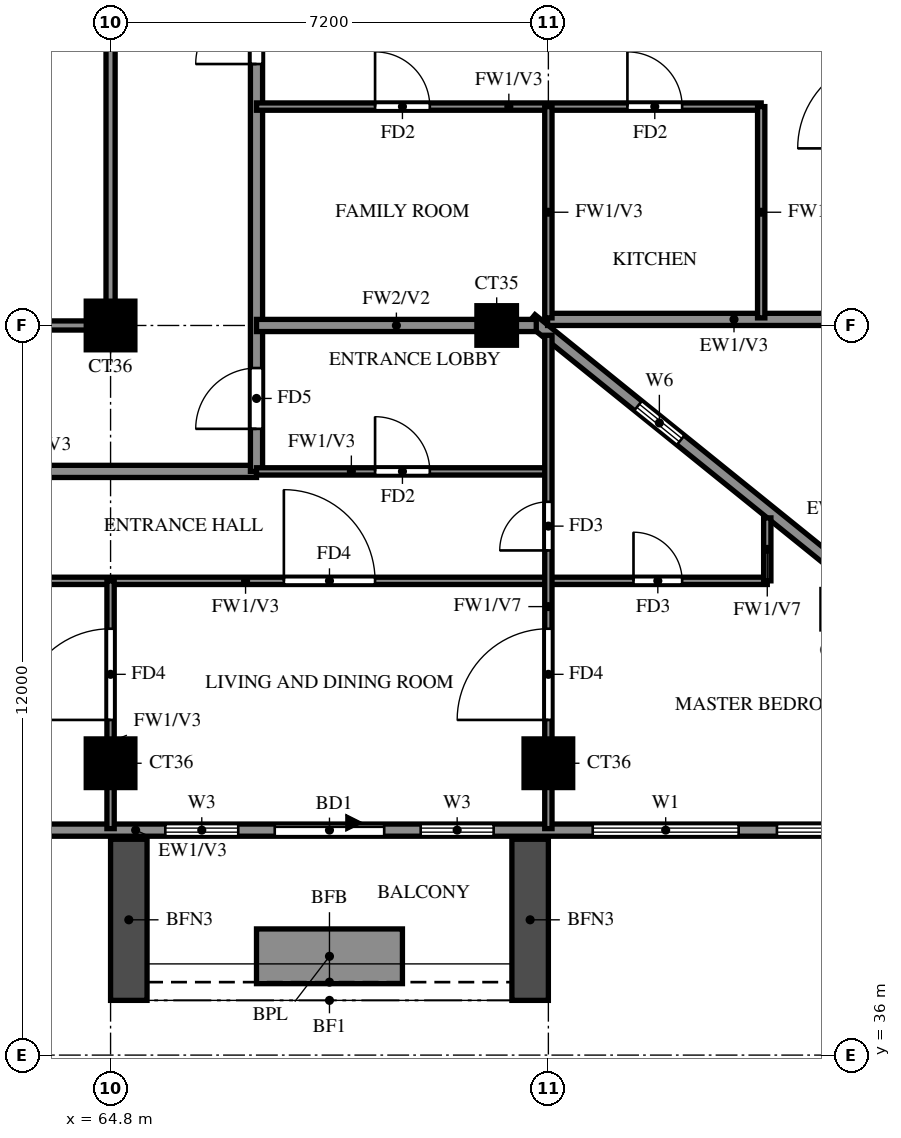
"""IFC4 building model, lengths in metres.
Left out: names, types, materials, properties, quantities, classifications, styles, units other than length and angle.
Written with IfcOpenShell. Run it as: python <this file> out.ifc"""

import sys

from ifc_helpers import new_model, si_unit, direction, frame, frame_2d, origin, origin_2d, place, context, subcontext, project, spatial, rectangle, extrude, source, transform, mapped, element, fill, save


model = new_model("IFC4")
c1 = context("Model", 3, precision=1e-05, world=origin(), true_north=direction((0.0, 1.0)))
c2 = subcontext(c1, "Body", "Model", "MODEL_VIEW")
j1 = project(units=[si_unit("LENGTHUNIT", "METRE"), si_unit("PLANEANGLEUNIT", "RADIAN")], contexts=[c1])
p1 = place(None, origin())
s1 = spatial("IfcSite", under=j1, at=p1, CompositionType="ELEMENT")
p2 = place(p1, origin())
s2 = spatial("IfcBuilding", under=s1, at=p2, CompositionType="ELEMENT")
p3 = place(p2, frame((0.0, 0.0, 232.5)))
s3 = spatial("IfcBuildingStorey", under=s2, at=p3, CompositionType="ELEMENT", Elevation=232.5)
m1 = source(origin(), c2, "Body", "SweptSolid", [
    extrude(rectangle(XDim=0.8, YDim=0.8, at=origin_2d()), origin(), (0.0, 0.0, 1.0), 3.22),
])
for number, where, z_axis, x_axis in (
    (1, (64.8, 40.8, 0.0), (0.0, 0.0, 1.0), (1.0, 0.0, 0.0)),
    (2, (72.0, 40.8, 0.0), (0.0, 0.0, 1.0), (1.0, 0.0, 0.0)),
):
    element("IfcColumn", number, at=place(p3, frame(where, z_axis=z_axis, x_axis=x_axis)), inside=s3, PredefinedType="COLUMN", context=c2, shape_type="MappedRepresentation", body=[
        mapped(m1, transform((0.0, 0.0, 0.0))),
    ])
m2 = source(origin(), c2, "Body", "SweptSolid", [
    extrude(rectangle(XDim=0.65, YDim=0.65, at=origin_2d()), origin(), (0.0, 0.0, 1.0), 3.22),
])
p4 = place(p3, frame((76.823, 43.333, 0.0), z_axis=(0.0, 0.0, 1.0), x_axis=(1.0, 0.0, 0.0)))
e3 = element("IfcColumn", 3, at=p4, inside=s3, PredefinedType="COLUMN", context=c2, shape_type="MappedRepresentation", body=[
    mapped(m2, transform((0.0, 0.0, 0.0))),
])
p5 = place(p3, frame((64.8, 48.0, 0.0), z_axis=(0.0, 0.0, 1.0), x_axis=(1.0, 0.0, 0.0)))
e4 = element("IfcColumn", 4, at=p5, inside=s3, PredefinedType="COLUMN", context=c2, shape_type="MappedRepresentation", body=[
    mapped(m1, transform((0.0, 0.0, 0.0))),
])
p6 = place(p3, frame((71.15, 48.0, 0.0), z_axis=(0.0, 0.0, 1.0), x_axis=(1.0, 0.0, 0.0)))
e5 = element("IfcColumn", 5, at=p6, inside=s3, PredefinedType="COLUMN", context=c2, shape_type="MappedRepresentation", body=[
    mapped(m2, transform((0.0, 0.0, 0.0))),
])
p7 = place(p3, frame((81.907, 39.87, 0.0), z_axis=(0.0, 0.0, 1.0), x_axis=(-0.777936274417, 0.62834318087, 0.0)))
e6 = element("IfcWall", 6, at=p7, inside=s3, PredefinedType="SOLIDWALL", context=c2, shape_type="SweptSolid", body=[
    extrude(rectangle(XDim=13.099, YDim=0.2, at=frame_2d((6.549, 0.0))), origin(), (0.0, 0.0, 1.0), 3.22),
])
p8 = place(p7, frame((9.938, 0.0, 1.5)))
e7 = element("IfcOpeningElement", 7, at=p8, cuts=e6, PredefinedType="OPENING", context=c2, shape_type="SweptSolid", body=[
    extrude(rectangle(XDim=0.9, YDim=0.9, at=frame_2d((0.45, 0.45))), frame((0.0, 0.11, 0.0), z_axis=(0.0, -1.0, 0.0), x_axis=(1.0, 0.0, 0.0)), (0.0, 0.0, 1.0), 0.22),
])
p9 = place(p3, frame((71.987, 48.1, 0.0), z_axis=(0.0, 0.0, 1.0), x_axis=(1.0, 0.0, 0.0)))
e8 = element("IfcWall", 8, at=p9, inside=s3, PredefinedType="SOLIDWALL", context=c2, shape_type="SweptSolid", body=[
    extrude(rectangle(XDim=6.813, YDim=0.2, at=frame_2d((3.406, 0.0))), origin(), (0.0, 0.0, 1.0), 3.22),
])
p10 = place(p3, frame((58.8, 39.7, 0.0), z_axis=(0.0, 0.0, 1.0), x_axis=(1.0, 0.0, 0.0)))
e9 = element("IfcWall", 9, at=p10, inside=s3, PredefinedType="SOLIDWALL", context=c2, shape_type="SweptSolid", body=[
    extrude(rectangle(XDim=23.317, YDim=0.2, at=frame_2d((11.658, 0.0))), origin(), (0.0, 0.0, 1.0), 3.22),
])
p11 = place(p10, frame((8.7, 0.0, 0.0)))
e10 = element("IfcOpeningElement", 10, at=p11, cuts=e9, PredefinedType="OPENING", context=c2, shape_type="SweptSolid", body=[
    extrude(rectangle(XDim=1.8, YDim=2.4, at=frame_2d((0.9, 1.2))), frame((0.0, 0.11, 0.0), z_axis=(0.0, -1.0, 0.0), x_axis=(1.0, 0.0, 0.0)), (0.0, 0.0, 1.0), 0.22),
])
p12 = place(p10, frame((6.9, 0.0, 0.6)))
e11 = element("IfcOpeningElement", 11, at=p12, cuts=e9, PredefinedType="OPENING", context=c2, shape_type="SweptSolid", body=[
    extrude(rectangle(XDim=1.2, YDim=2.4, at=frame_2d((0.6, 1.2))), frame((0.0, 0.11, 0.0), z_axis=(0.0, -1.0, 0.0), x_axis=(1.0, 0.0, 0.0)), (0.0, 0.0, 1.0), 0.22),
])
p13 = place(p10, frame((11.1, 0.0, 0.6)))
e12 = element("IfcOpeningElement", 12, at=p13, cuts=e9, PredefinedType="OPENING", context=c2, shape_type="SweptSolid", body=[
    extrude(rectangle(XDim=1.2, YDim=2.4, at=frame_2d((0.6, 1.2))), frame((0.0, 0.11, 0.0), z_axis=(0.0, -1.0, 0.0), x_axis=(1.0, 0.0, 0.0)), (0.0, 0.0, 1.0), 0.22),
])
p14 = place(p10, frame((13.929, 0.0, 0.6)))
e13 = element("IfcOpeningElement", 13, at=p14, cuts=e9, PredefinedType="OPENING", context=c2, shape_type="SweptSolid", body=[
    extrude(rectangle(XDim=2.4, YDim=2.4, at=frame_2d((1.2, 1.2))), frame((0.0, 0.11, 0.0), z_axis=(0.0, -1.0, 0.0), x_axis=(1.0, 0.0, 0.0)), (0.0, 0.0, 1.0), 0.22),
])
p15 = place(p10, frame((16.958, 0.0, 0.6)))
e14 = element("IfcOpeningElement", 14, at=p15, cuts=e9, PredefinedType="OPENING", context=c2, shape_type="SweptSolid", body=[
    extrude(rectangle(XDim=2.4, YDim=2.4, at=frame_2d((1.2, 1.2))), frame((0.0, 0.11, 0.0), z_axis=(0.0, -1.0, 0.0), x_axis=(1.0, 0.0, 0.0)), (0.0, 0.0, 1.0), 0.22),
])
p16 = place(p10, frame((19.988, 0.0, 0.6)))
e15 = element("IfcOpeningElement", 15, at=p16, cuts=e9, PredefinedType="OPENING", context=c2, shape_type="SweptSolid", body=[
    extrude(rectangle(XDim=2.4, YDim=2.4, at=frame_2d((1.2, 1.2))), frame((0.0, 0.11, 0.0), z_axis=(0.0, -1.0, 0.0), x_axis=(1.0, 0.0, 0.0)), (0.0, 0.0, 1.0), 0.22),
])
for number, where, z_axis, x_axis in (
    (16, (65.1, 39.55, 0.0), (0.0, 0.0, 1.0), (0.0, -1.0, 0.0)),
    (17, (71.7, 39.55, 0.0), (0.0, 0.0, 1.0), (0.0, -1.0, 0.0)),
):
    element("IfcWall", number, at=place(p3, frame(where, z_axis=z_axis, x_axis=x_axis)), inside=s3, PredefinedType="SOLIDWALL", context=c2, shape_type="SweptSolid", body=[
        extrude(rectangle(XDim=2.65, YDim=0.6, at=frame_2d((1.325, 0.0))), origin(), (0.0, 0.0, 1.0), 2.85),
    ])
p17 = place(p3, frame((67.2, 37.625, 0.0), z_axis=(0.0, 0.0, 1.0), x_axis=(1.0, 0.0, 0.0)))
e18 = element("IfcWall", 18, at=p17, inside=s3, PredefinedType="SOLIDWALL", context=c2, shape_type="SweptSolid", body=[
    extrude(rectangle(XDim=2.4, YDim=0.9, at=frame_2d((1.2, 0.0))), origin(), (0.0, 0.0, 1.0), 0.9),
])
p18 = place(p3, frame((60.0, 45.6, 0.0), z_axis=(0.0, 0.0, 1.0), x_axis=(1.0, 0.0, 0.0)))
e19 = element("IfcWall", 19, at=p18, inside=s3, PredefinedType="SOLIDWALL", context=c2, shape_type="SweptSolid", body=[
    extrude(rectangle(XDim=7.2, YDim=0.2, at=frame_2d((3.6, 0.0))), origin(), (0.0, 0.0, 1.0), 3.22),
])
p19 = place(p3, frame((67.2, 45.6, 0.0), z_axis=(0.0, 0.0, 1.0), x_axis=(0.0, 1.0, 0.0)))
e20 = element("IfcWall", 20, at=p19, inside=s3, PredefinedType="SOLIDWALL", context=c2, shape_type="SweptSolid", body=[
    extrude(rectangle(XDim=16.8, YDim=0.2, at=frame_2d((8.4, 0.0))), origin(), (0.0, 0.0, 1.0), 3.22),
])
p20 = place(p19, frame((6.7, 0.0, 0.0)))
e21 = element("IfcOpeningElement", 21, at=p20, cuts=e20, PredefinedType="OPENING", context=c2, shape_type="SweptSolid", body=[
    extrude(rectangle(XDim=1.0, YDim=2.1, at=frame_2d((0.5, 1.05))), frame((0.0, 0.11, 0.0), z_axis=(0.0, -1.0, 0.0), x_axis=(1.0, 0.0, 0.0)), (0.0, 0.0, 1.0), 0.22),
])
p21 = place(p19, frame((15.1, 0.0, 0.0)))
e22 = element("IfcOpeningElement", 22, at=p21, cuts=e20, PredefinedType="OPENING", context=c2, shape_type="SweptSolid", body=[
    extrude(rectangle(XDim=1.0, YDim=2.1, at=frame_2d((0.5, 1.05))), frame((0.0, 0.11, 0.0), z_axis=(0.0, -1.0, 0.0), x_axis=(1.0, 0.0, 0.0)), (0.0, 0.0, 1.0), 0.22),
])
p22 = place(p19, frame((0.7, 0.0, 0.0)))
e23 = element("IfcOpeningElement", 23, at=p22, cuts=e20, PredefinedType="OPENING", context=c2, shape_type="SweptSolid", body=[
    extrude(rectangle(XDim=1.0, YDim=2.1, at=frame_2d((0.5, 1.05))), frame((0.0, 0.11, 0.0), z_axis=(0.0, -1.0, 0.0), x_axis=(1.0, 0.0, 0.0)), (0.0, 0.0, 1.0), 0.22),
])
p23 = place(p3, frame((67.2, 48.0, 0.0), z_axis=(0.0, 0.0, 1.0), x_axis=(1.0, 0.0, 0.0)))
e24 = element("IfcWall", 24, at=p23, inside=s3, PredefinedType="SOLIDWALL", context=c2, shape_type="SweptSolid", body=[
    extrude(rectangle(XDim=4.601, YDim=0.2, at=frame_2d((2.301, 0.0))), origin(), (0.0, 0.0, 1.0), 3.22),
])
p24 = place(p3, frame((60.0, 43.8, 0.0), z_axis=(0.0, 0.0, 1.0), x_axis=(1.0, 0.0, 0.0)))
e25 = element("IfcWall", 25, at=p24, inside=s3, PredefinedType="PARTITIONING", context=c2, shape_type="SweptSolid", body=[
    extrude(rectangle(XDim=15.6, YDim=0.12, at=frame_2d((7.8, 0.0))), origin(), (0.0, 0.0, 1.0), 3.22),
])
p25 = place(p24, frame((7.65, 0.0, 0.0)))
e26 = element("IfcOpeningElement", 26, at=p25, cuts=e25, PredefinedType="OPENING", context=c2, shape_type="SweptSolid", body=[
    extrude(rectangle(XDim=1.5, YDim=2.1, at=frame_2d((0.75, 1.05))), frame((0.0, 0.07, 0.0), z_axis=(0.0, -1.0, 0.0), x_axis=(1.0, 0.0, 0.0)), (0.0, 0.0, 1.0), 0.14),
])
p26 = place(p24, frame((1.95, 0.0, 0.0)))
e27 = element("IfcOpeningElement", 27, at=p26, cuts=e25, PredefinedType="OPENING", context=c2, shape_type="SweptSolid", body=[
    extrude(rectangle(XDim=0.9, YDim=2.1, at=frame_2d((0.45, 1.05))), frame((0.0, 0.07, 0.0), z_axis=(0.0, -1.0, 0.0), x_axis=(1.0, 0.0, 0.0)), (0.0, 0.0, 1.0), 0.14),
])
p27 = place(p24, frame((13.4, 0.0, 0.0)))
e28 = element("IfcOpeningElement", 28, at=p27, cuts=e25, PredefinedType="OPENING", context=c2, shape_type="SweptSolid", body=[
    extrude(rectangle(XDim=0.8, YDim=2.1, at=frame_2d((0.4, 1.05))), frame((0.0, 0.07, 0.0), z_axis=(0.0, -1.0, 0.0), x_axis=(1.0, 0.0, 0.0)), (0.0, 0.0, 1.0), 0.14),
])
p28 = place(p3, frame((67.2, 45.6, 0.0), z_axis=(0.0, 0.0, 1.0), x_axis=(1.0, 0.0, 0.0)))
e29 = element("IfcWall", 29, at=p28, inside=s3, PredefinedType="PARTITIONING", context=c2, shape_type="SweptSolid", body=[
    extrude(rectangle(XDim=4.8, YDim=0.12, at=frame_2d((2.4, 0.0))), origin(), (0.0, 0.0, 1.0), 3.22),
])
p29 = place(p28, frame((1.95, 0.0, 0.0)))
e30 = element("IfcOpeningElement", 30, at=p29, cuts=e29, PredefinedType="OPENING", context=c2, shape_type="SweptSolid", body=[
    extrude(rectangle(XDim=0.9, YDim=2.1, at=frame_2d((0.45, 1.05))), frame((0.0, 0.07, 0.0), z_axis=(0.0, -1.0, 0.0), x_axis=(1.0, 0.0, 0.0)), (0.0, 0.0, 1.0), 0.14),
])
p30 = place(p3, frame((67.2, 51.6, 0.0), z_axis=(0.0, 0.0, 1.0), x_axis=(1.0, 0.0, 0.0)))
e31 = element("IfcWall", 31, at=p30, inside=s3, PredefinedType="PARTITIONING", context=c2, shape_type="SweptSolid", body=[
    extrude(rectangle(XDim=8.3, YDim=0.12, at=frame_2d((4.15, 0.0))), origin(), (0.0, 0.0, 1.0), 3.22),
])
p31 = place(p30, frame((6.1, 0.0, 0.0)))
e32 = element("IfcOpeningElement", 32, at=p31, cuts=e31, PredefinedType="OPENING", context=c2, shape_type="SweptSolid", body=[
    extrude(rectangle(XDim=0.9, YDim=2.1, at=frame_2d((0.45, 1.05))), frame((0.0, 0.07, 0.0), z_axis=(0.0, -1.0, 0.0), x_axis=(1.0, 0.0, 0.0)), (0.0, 0.0, 1.0), 0.14),
])
p32 = place(p30, frame((1.95, 0.0, 0.0)))
e33 = element("IfcOpeningElement", 33, at=p32, cuts=e31, PredefinedType="OPENING", context=c2, shape_type="SweptSolid", body=[
    extrude(rectangle(XDim=0.9, YDim=2.1, at=frame_2d((0.45, 1.05))), frame((0.0, 0.07, 0.0), z_axis=(0.0, -1.0, 0.0), x_axis=(1.0, 0.0, 0.0)), (0.0, 0.0, 1.0), 0.14),
])
p33 = place(p3, frame((64.8, 39.725, 0.0), z_axis=(0.0, 0.0, 1.0), x_axis=(0.0, 1.0, 0.0)))
e34 = element("IfcWall", 34, at=p33, inside=s3, PredefinedType="PARTITIONING", context=c2, shape_type="SweptSolid", body=[
    extrude(rectangle(XDim=4.075, YDim=0.12, at=frame_2d((2.038, 0.0))), origin(), (0.0, 0.0, 1.0), 3.22),
])
p34 = place(p33, frame((1.788, 0.0, 0.0)))
e35 = element("IfcOpeningElement", 35, at=p34, cuts=e34, PredefinedType="OPENING", context=c2, shape_type="SweptSolid", body=[
    extrude(rectangle(XDim=1.5, YDim=2.1, at=frame_2d((0.75, 1.05))), frame((0.0, 0.07, 0.0), z_axis=(0.0, -1.0, 0.0), x_axis=(1.0, 0.0, 0.0)), (0.0, 0.0, 1.0), 0.14),
])
p35 = place(p3, frame((72.0, 39.725, 0.0), z_axis=(0.0, 0.0, 1.0), x_axis=(0.0, 1.0, 0.0)))
e36 = element("IfcWall", 36, at=p35, inside=s3, PredefinedType="PARTITIONING", context=c2, shape_type="SweptSolid", body=[
    extrude(rectangle(XDim=8.114, YDim=0.12, at=frame_2d((4.057, 0.0))), origin(), (0.0, 0.0, 1.0), 2.32),
])
p36 = place(p35, frame((1.788, 0.0, 0.0)))
e37 = element("IfcOpeningElement", 37, at=p36, cuts=e36, PredefinedType="OPENING", context=c2, shape_type="SweptSolid", body=[
    extrude(rectangle(XDim=1.5, YDim=2.1, at=frame_2d((0.75, 1.05))), frame((0.0, 0.07, 0.0), z_axis=(0.0, -1.0, 0.0), x_axis=(1.0, 0.0, 0.0)), (0.0, 0.0, 1.0), 0.14),
])
p37 = place(p35, frame((4.575, 0.0, 0.0)))
e38 = element("IfcOpeningElement", 38, at=p37, cuts=e36, PredefinedType="OPENING", context=c2, shape_type="SweptSolid", body=[
    extrude(rectangle(XDim=0.8, YDim=2.1, at=frame_2d((0.4, 1.05))), frame((0.0, 0.07, 0.0), z_axis=(0.0, -1.0, 0.0), x_axis=(1.0, 0.0, 0.0)), (0.0, 0.0, 1.0), 0.14),
])
for number, where, z_axis, x_axis in (
    (39, (72.0, 48.125, 0.0), (0.0, 0.0, 1.0), (0.0, 1.0, 0.0)),
    (40, (75.5, 48.125, 0.0), (0.0, 0.0, 1.0), (0.0, 1.0, 0.0)),
):
    element("IfcWall", number, at=place(p3, frame(where, z_axis=z_axis, x_axis=x_axis)), inside=s3, PredefinedType="PARTITIONING", context=c2, shape_type="SweptSolid", body=[
        extrude(rectangle(XDim=3.475, YDim=0.12, at=frame_2d((1.738, 0.0))), origin(), (0.0, 0.0, 1.0), 3.22),
    ])
p38 = place(p3, frame((75.6, 43.8, 0.0), z_axis=(0.0, 0.0, 1.0), x_axis=(0.0, 1.0, 0.0)))
e41 = element("IfcWall", 41, at=p38, inside=s3, PredefinedType="PARTITIONING", context=c2, shape_type="SweptSolid", body=[
    extrude(rectangle(XDim=1.035, YDim=0.12, at=frame_2d((0.518, 0.0))), origin(), (0.0, 0.0, 1.0), 2.32),
])
p39 = place(p3, frame((57.6, 48.0, 0.0), z_axis=(0.0, 0.0, 1.0), x_axis=(1.0, 0.0, 0.0)))
e42 = element("IfcWall", 42, at=p39, inside=s3, PredefinedType="SOLIDWALL", context=c2, shape_type="SweptSolid", body=[
    extrude(rectangle(XDim=7.2, YDim=0.15, at=frame_2d((3.6, 0.0))), origin(), (0.0, 0.0, 1.0), 2.32),
])
p40 = place(p3, frame((64.8, 48.0, 0.0), z_axis=(0.0, 0.0, 1.0), x_axis=(0.0, 1.0, 0.0)))
e43 = element("IfcWall", 43, at=p40, inside=s3, PredefinedType="SOLIDWALL", context=c2, shape_type="SweptSolid", body=[
    extrude(rectangle(XDim=14.4, YDim=0.15, at=frame_2d((7.2, 0.0))), origin(), (0.0, 0.0, 1.0), 2.32),
])
p41 = place(p8, origin())
e44 = element("IfcWindow", 44, at=p41, inside=s3, PartitioningType="SINGLE_PANEL", PredefinedType="WINDOW", context=c2, shape_type="SweptSolid", body=[
    extrude(rectangle(XDim=0.9, YDim=0.9, at=frame_2d((0.45, 0.45))), frame((0.0, 0.03, 0.0), z_axis=(0.0, -1.0, 0.0), x_axis=(1.0, 0.0, 0.0)), (0.0, 0.0, 1.0), 0.06),
])
fill(e7, e44)
p42 = place(p11, origin())
e45 = element("IfcDoor", 45, at=p42, inside=s3, OperationType="DOUBLE_DOOR_SLIDING", PredefinedType="DOOR", context=c2, shape_type="SweptSolid", body=[
    extrude(rectangle(XDim=1.8, YDim=2.4, at=frame_2d((0.9, 1.2))), frame((0.0, 0.025, 0.0), z_axis=(0.0, -1.0, 0.0), x_axis=(1.0, 0.0, 0.0)), (0.0, 0.0, 1.0), 0.05),
])
fill(e10, e45)
p43 = place(p12, origin())
e46 = element("IfcWindow", 46, at=p43, inside=s3, PartitioningType="SINGLE_PANEL", PredefinedType="WINDOW", context=c2, shape_type="SweptSolid", body=[
    extrude(rectangle(XDim=1.2, YDim=2.4, at=frame_2d((0.6, 1.2))), frame((0.0, 0.03, 0.0), z_axis=(0.0, -1.0, 0.0), x_axis=(1.0, 0.0, 0.0)), (0.0, 0.0, 1.0), 0.06),
])
fill(e11, e46)
p44 = place(p13, origin())
e47 = element("IfcWindow", 47, at=p44, inside=s3, PartitioningType="SINGLE_PANEL", PredefinedType="WINDOW", context=c2, shape_type="SweptSolid", body=[
    extrude(rectangle(XDim=1.2, YDim=2.4, at=frame_2d((0.6, 1.2))), frame((0.0, 0.03, 0.0), z_axis=(0.0, -1.0, 0.0), x_axis=(1.0, 0.0, 0.0)), (0.0, 0.0, 1.0), 0.06),
])
fill(e12, e47)
p45 = place(p14, origin())
e48 = element("IfcWindow", 48, at=p45, inside=s3, PartitioningType="DOUBLE_PANEL_VERTICAL", PredefinedType="WINDOW", context=c2, shape_type="SweptSolid", body=[
    extrude(rectangle(XDim=2.4, YDim=2.4, at=frame_2d((1.2, 1.2))), frame((0.0, 0.03, 0.0), z_axis=(0.0, -1.0, 0.0), x_axis=(1.0, 0.0, 0.0)), (0.0, 0.0, 1.0), 0.06),
])
fill(e13, e48)
p46 = place(p15, origin())
e49 = element("IfcWindow", 49, at=p46, inside=s3, PartitioningType="DOUBLE_PANEL_VERTICAL", PredefinedType="WINDOW", context=c2, shape_type="SweptSolid", body=[
    extrude(rectangle(XDim=2.4, YDim=2.4, at=frame_2d((1.2, 1.2))), frame((0.0, 0.03, 0.0), z_axis=(0.0, -1.0, 0.0), x_axis=(1.0, 0.0, 0.0)), (0.0, 0.0, 1.0), 0.06),
])
fill(e14, e49)
p47 = place(p20, origin())
e50 = element("IfcDoor", 50, at=p47, inside=s3, OperationType="SINGLE_SWING_RIGHT", PredefinedType="DOOR", context=c2, shape_type="SweptSolid", body=[
    extrude(rectangle(XDim=1.0, YDim=2.1, at=frame_2d((0.5, 1.05))), frame((0.0, 0.025, 0.0), z_axis=(0.0, -1.0, 0.0), x_axis=(1.0, 0.0, 0.0)), (0.0, 0.0, 1.0), 0.05),
])
fill(e21, e50)
p48 = place(p31, origin())
e51 = element("IfcDoor", 51, at=p48, inside=s3, OperationType="SINGLE_SWING_LEFT", PredefinedType="DOOR", context=c2, shape_type="SweptSolid", body=[
    extrude(rectangle(XDim=0.9, YDim=2.1, at=frame_2d((0.45, 1.05))), frame((0.0, 0.025, 0.0), z_axis=(0.0, -1.0, 0.0), x_axis=(1.0, 0.0, 0.0)), (0.0, 0.0, 1.0), 0.05),
])
fill(e32, e51)
p49 = place(p32, origin())
e52 = element("IfcDoor", 52, at=p49, inside=s3, OperationType="SINGLE_SWING_LEFT", PredefinedType="DOOR", context=c2, shape_type="SweptSolid", body=[
    extrude(rectangle(XDim=0.9, YDim=2.1, at=frame_2d((0.45, 1.05))), frame((0.0, 0.025, 0.0), z_axis=(0.0, -1.0, 0.0), x_axis=(1.0, 0.0, 0.0)), (0.0, 0.0, 1.0), 0.05),
])
fill(e33, e52)
p50 = place(p34, origin())
e53 = element("IfcDoor", 53, at=p50, inside=s3, OperationType="SINGLE_SWING_LEFT", PredefinedType="DOOR", context=c2, shape_type="SweptSolid", body=[
    extrude(rectangle(XDim=1.5, YDim=2.1, at=frame_2d((0.75, 1.05))), frame((0.0, 0.025, 0.0), z_axis=(0.0, -1.0, 0.0), x_axis=(1.0, 0.0, 0.0)), (0.0, 0.0, 1.0), 0.05),
])
fill(e35, e53)
p51 = place(p29, origin())
e54 = element("IfcDoor", 54, at=p51, inside=s3, OperationType="SINGLE_SWING_LEFT", PredefinedType="DOOR", context=c2, shape_type="SweptSolid", body=[
    extrude(rectangle(XDim=0.9, YDim=2.1, at=frame_2d((0.45, 1.05))), frame((0.0, 0.025, 0.0), z_axis=(0.0, -1.0, 0.0), x_axis=(1.0, 0.0, 0.0)), (0.0, 0.0, 1.0), 0.05),
])
fill(e30, e54)
p52 = place(p22, origin())
e55 = element("IfcDoor", 55, at=p52, inside=s3, OperationType="SINGLE_SWING_LEFT", PredefinedType="DOOR", context=c2, shape_type="SweptSolid", body=[
    extrude(rectangle(XDim=1.0, YDim=2.1, at=frame_2d((0.5, 1.05))), frame((0.0, 0.025, 0.0), z_axis=(0.0, -1.0, 0.0), x_axis=(1.0, 0.0, 0.0)), (0.0, 0.0, 1.0), 0.05),
])
fill(e23, e55)
p53 = place(p25, origin())
e56 = element("IfcDoor", 56, at=p53, inside=s3, OperationType="SINGLE_SWING_RIGHT", PredefinedType="DOOR", context=c2, shape_type="SweptSolid", body=[
    extrude(rectangle(XDim=1.5, YDim=2.1, at=frame_2d((0.75, 1.05))), frame((0.0, 0.025, 0.0), z_axis=(0.0, -1.0, 0.0), x_axis=(1.0, 0.0, 0.0)), (0.0, 0.0, 1.0), 0.05),
])
fill(e26, e56)
p54 = place(p36, origin())
e57 = element("IfcDoor", 57, at=p54, inside=s3, OperationType="SINGLE_SWING_RIGHT", PredefinedType="DOOR", context=c2, shape_type="SweptSolid", body=[
    extrude(rectangle(XDim=1.5, YDim=2.1, at=frame_2d((0.75, 1.05))), frame((0.0, 0.025, 0.0), z_axis=(0.0, -1.0, 0.0), x_axis=(1.0, 0.0, 0.0)), (0.0, 0.0, 1.0), 0.05),
])
fill(e37, e57)
p55 = place(p37, origin())
e58 = element("IfcDoor", 58, at=p55, inside=s3, OperationType="SINGLE_SWING_RIGHT", PredefinedType="DOOR", context=c2, shape_type="SweptSolid", body=[
    extrude(rectangle(XDim=0.8, YDim=2.1, at=frame_2d((0.4, 1.05))), frame((0.0, 0.025, 0.0), z_axis=(0.0, -1.0, 0.0), x_axis=(1.0, 0.0, 0.0)), (0.0, 0.0, 1.0), 0.05),
])
fill(e38, e58)
p56 = place(p27, origin())
e59 = element("IfcDoor", 59, at=p56, inside=s3, OperationType="SINGLE_SWING_LEFT", PredefinedType="DOOR", context=c2, shape_type="SweptSolid", body=[
    extrude(rectangle(XDim=0.8, YDim=2.1, at=frame_2d((0.4, 1.05))), frame((0.0, 0.025, 0.0), z_axis=(0.0, -1.0, 0.0), x_axis=(1.0, 0.0, 0.0)), (0.0, 0.0, 1.0), 0.05),
])
fill(e28, e59)
save(model, sys.argv[1])
